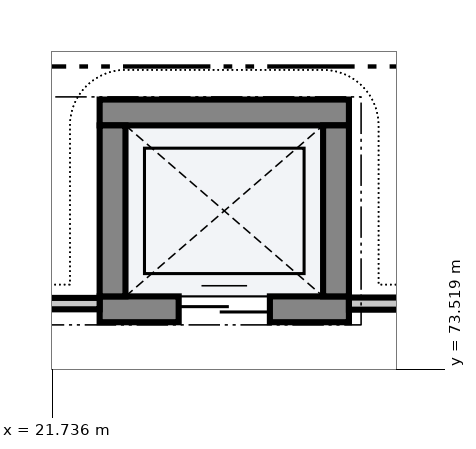
"""IFC4 building model, lengths in metres.
Left out: names, types, materials, properties, quantities, classifications, styles, units other than length and angle.
Written with IfcOpenShell. Run it as: python <this file> out.ifc"""

import sys

from ifc_helpers import new_model, si_unit, direction, frame, frame_2d, origin, place, context, subcontext, project, spatial, rectangle, extrude, element, fill, save


model = new_model("IFC4")
c1 = context("Model", 3, precision=1e-05, world=origin(), true_north=direction((0.0, 1.0)))
c2 = subcontext(c1, "Body", "Model", "MODEL_VIEW")
j1 = project(units=[si_unit("LENGTHUNIT", "METRE"), si_unit("PLANEANGLEUNIT", "RADIAN")], contexts=[c1])
p1 = place(None, origin())
s1 = spatial("IfcSite", under=j1, at=p1, CompositionType="ELEMENT")
p2 = place(p1, origin())
s2 = spatial("IfcBuilding", under=s1, at=p2, CompositionType="ELEMENT")
p3 = place(p2, origin())
s3 = spatial("IfcBuildingStorey", under=s2, at=p3, CompositionType="ELEMENT", Elevation=0.0)
p4 = place(p3, frame((22.36, 74.305, 0.0), z_axis=(0.0, 0.0, 1.0), x_axis=(1.0, 0.0, 0.0)))
e1 = element("IfcWall", 1, at=p4, inside=s3, PredefinedType="SHEAR", context=c2, shape_type="SweptSolid", body=[
    extrude(rectangle(XDim=3.28, YDim=0.34, at=frame_2d((1.64, 0.0))), origin(), (0.0, 0.0, 1.0), 5.09),
])
p5 = place(p4, frame((1.04, 0.0, 0.0)))
e2 = element("IfcOpeningElement", 2, at=p5, cuts=e1, PredefinedType="OPENING", context=c2, shape_type="SweptSolid", body=[
    extrude(rectangle(XDim=1.2, YDim=2.2, at=frame_2d((0.6, 1.1))), frame((0.0, 0.182, 0.0), z_axis=(0.0, -1.0, 0.0), x_axis=(1.0, 0.0, 0.0)), (0.0, 0.0, 1.0), 0.364),
])
p6 = place(p3, frame((22.36, 76.895, 0.0), z_axis=(0.0, 0.0, 1.0), x_axis=(1.0, 0.0, 0.0)))
e3 = element("IfcWall", 3, at=p6, inside=s3, PredefinedType="SHEAR", context=c2, shape_type="SweptSolid", body=[
    extrude(rectangle(XDim=3.28, YDim=0.34, at=frame_2d((1.64, 0.0))), origin(), (0.0, 0.0, 1.0), 5.09),
])
for number, where, z_axis, x_axis in (
    (4, (22.53, 74.475, 0.0), (0.0, 0.0, 1.0), (0.0, 1.0, 0.0)),
    (5, (25.47, 74.475, 0.0), (0.0, 0.0, 1.0), (0.0, 1.0, 0.0)),
):
    element("IfcWall", number, at=place(p3, frame(where, z_axis=z_axis, x_axis=x_axis)), inside=s3, PredefinedType="SHEAR", context=c2, shape_type="SweptSolid", body=[
        extrude(rectangle(XDim=2.25, YDim=0.34, at=frame_2d((1.125, 0.0))), origin(), (0.0, 0.0, 1.0), 5.09),
    ])
p7 = place(p3, frame((48.02, 74.38, 0.0), z_axis=(0.0, 0.0, 1.0), x_axis=(-1.0, 0.0, 0.0)))
e6 = element("IfcWall", 6, at=p7, inside=s3, PredefinedType="PARTITIONING", context=c2, shape_type="SweptSolid", body=[
    extrude(rectangle(XDim=22.38, YDim=0.16, at=frame_2d((11.19, 0.0))), origin(), (0.0, 0.0, 1.0), 4.03),
])
p8 = place(p7, frame((10.412, 0.0, 0.0)))
e7 = element("IfcOpeningElement", 7, at=p8, cuts=e6, PredefinedType="OPENING", context=c2, shape_type="SweptSolid", body=[
    extrude(rectangle(XDim=1.15, YDim=2.2, at=frame_2d((0.575, 1.1))), frame((0.0, 0.092, 0.0), z_axis=(0.0, -1.0, 0.0), x_axis=(1.0, 0.0, 0.0)), (0.0, 0.0, 1.0), 0.184),
])
p9 = place(p3, frame((22.36, 74.38, 0.0), z_axis=(0.0, 0.0, 1.0), x_axis=(-1.0, 0.0, 0.0)))
e8 = element("IfcWall", 8, at=p9, inside=s3, PredefinedType="PARTITIONING", context=c2, shape_type="SweptSolid", body=[
    extrude(rectangle(XDim=6.32, YDim=0.15, at=frame_2d((3.16, 0.0))), origin(), (0.0, 0.0, 1.0), 4.03),
])
p10 = place(p5, origin())
e9 = element("IfcDoor", 9, at=p10, inside=s3, OperationType="DOUBLE_DOOR_SLIDING", PredefinedType="DOOR", context=c2, shape_type="SweptSolid", body=[
    extrude(rectangle(XDim=1.2, YDim=2.2, at=frame_2d((0.6, 1.1))), frame((0.0, 0.025, 0.0), z_axis=(0.0, -1.0, 0.0), x_axis=(1.0, 0.0, 0.0)), (0.0, 0.0, 1.0), 0.05),
])
fill(e2, e9)
save(model, sys.argv[1])
